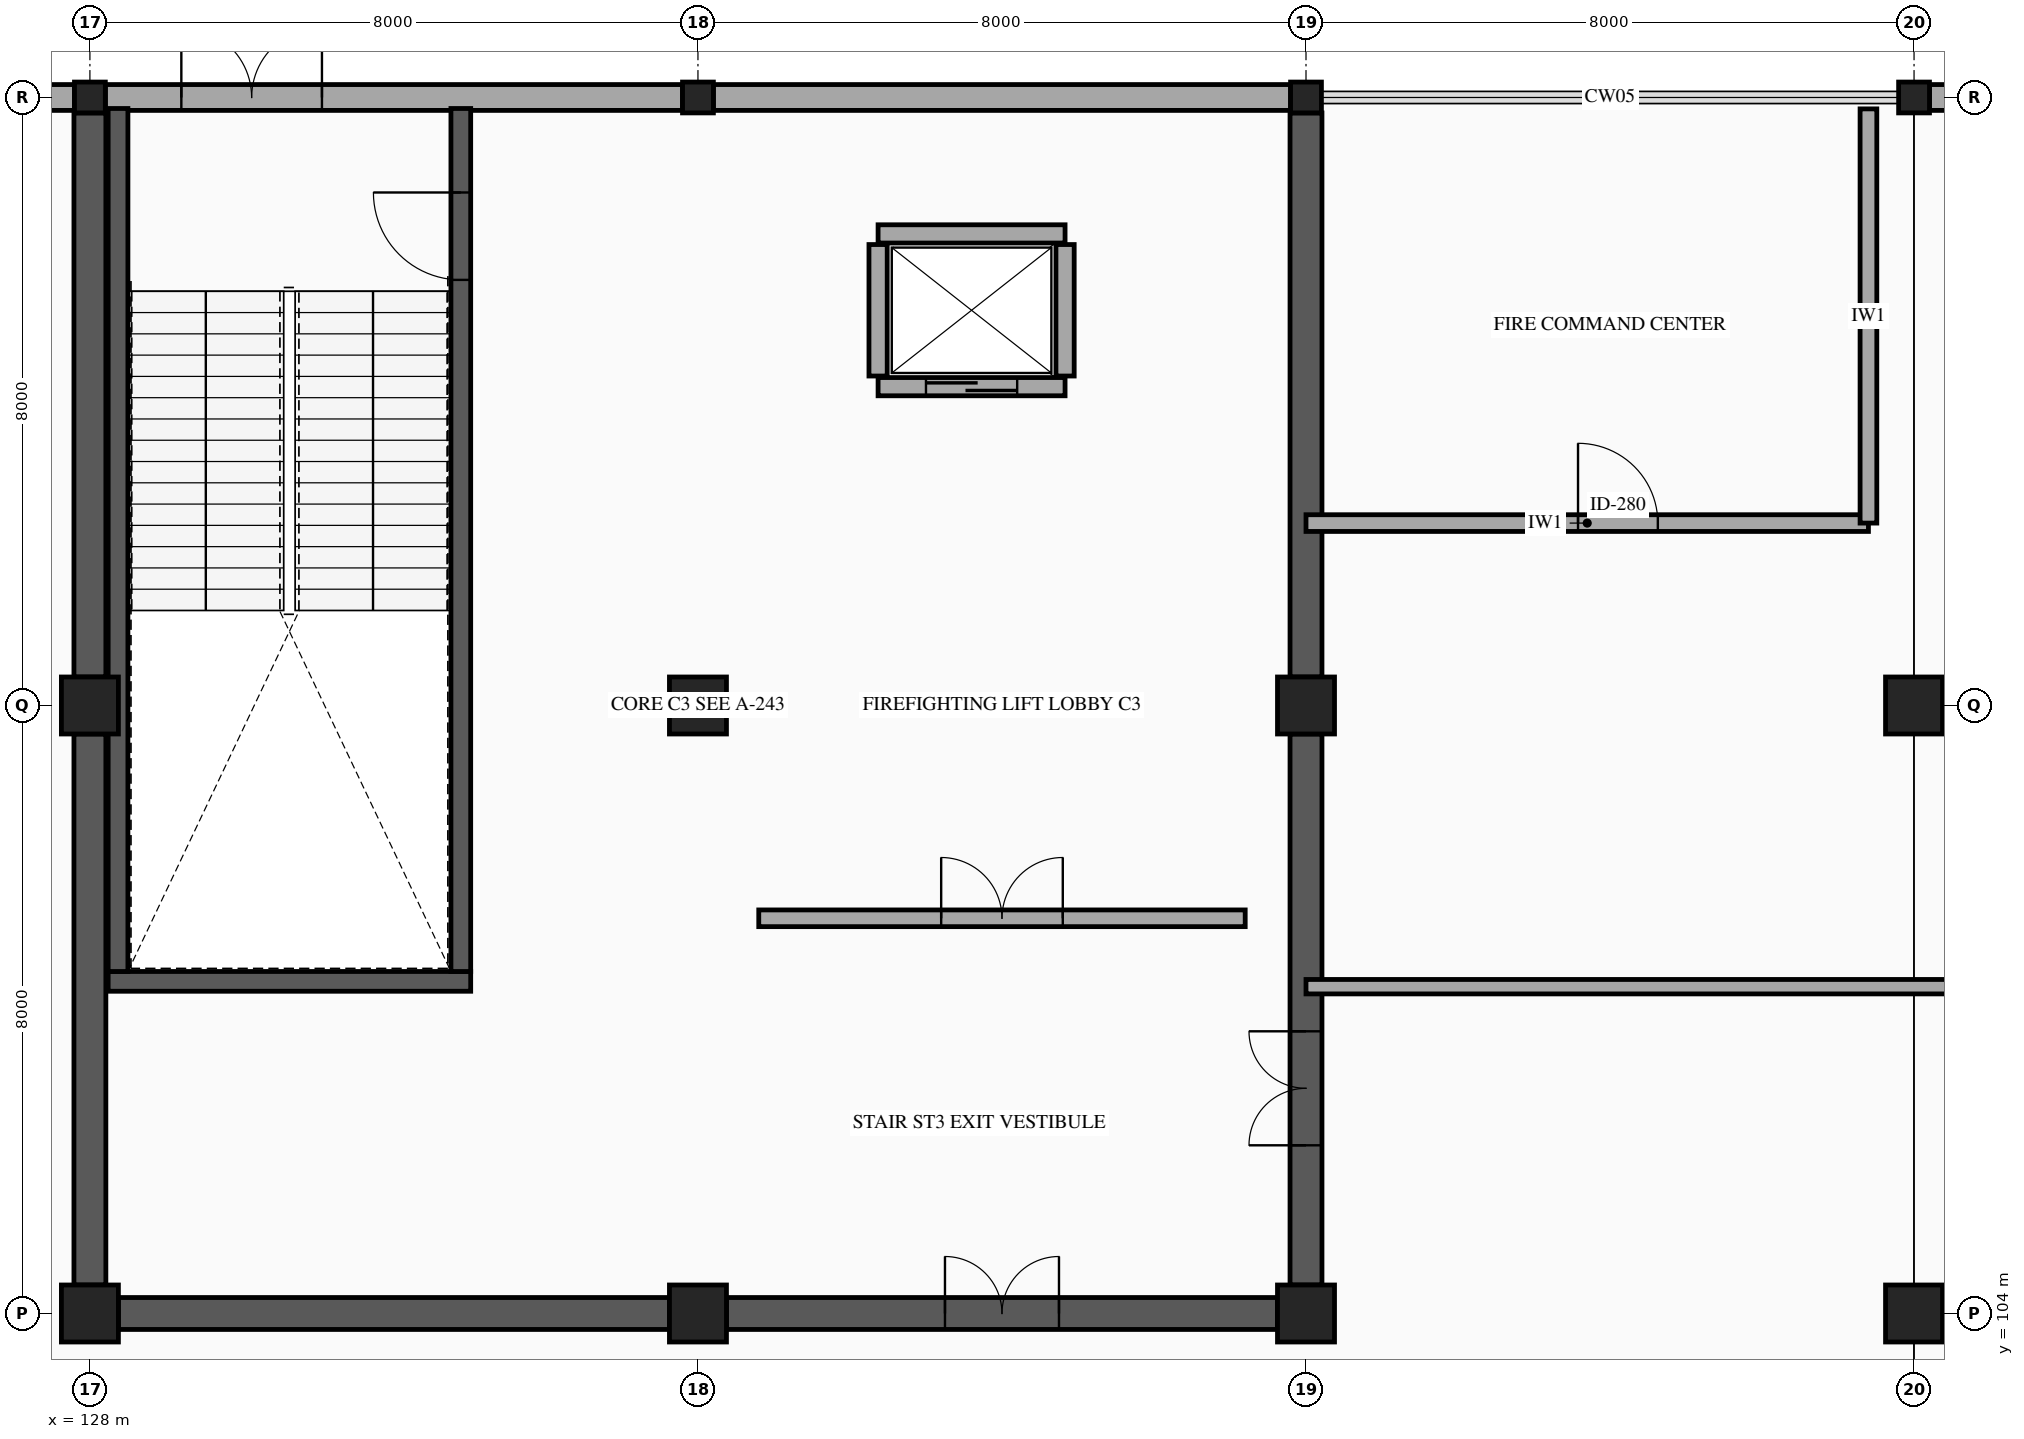
"""IFC4 building model, lengths in metres.
Left out: names, types, materials, properties, quantities, classifications, styles, units other than length and angle.
Written with IfcOpenShell. Run it as: python <this file> out.ifc"""

import sys

from ifc_helpers import new_model, si_unit, direction, frame, frame_2d, origin, origin_2d, place, context, subcontext, project, spatial, rectangle, hollow_rectangle, extrude, element, fill, save


model = new_model("IFC4")
c1 = context("Model", 3, precision=1e-05, world=origin(), true_north=direction((0.0, 1.0)))
c2 = subcontext(c1, "Body", "Model", "MODEL_VIEW")
j1 = project(units=[si_unit("LENGTHUNIT", "METRE"), si_unit("PLANEANGLEUNIT", "RADIAN")], contexts=[c1])
p1 = place(None, origin())
s1 = spatial("IfcSite", under=j1, at=p1, CompositionType="ELEMENT")
p2 = place(p1, origin())
s2 = spatial("IfcBuilding", under=s1, at=p2, CompositionType="ELEMENT")
p3 = place(p2, origin())
s3 = spatial("IfcBuildingStorey", under=s2, at=p3, CompositionType="ELEMENT", Elevation=0.0)
for number, where, z_axis, x_axis in (
    (1, (128.0, 104.0, 0.0), (0.0, 0.0, 1.0), (1.0, 0.0, 0.0)),
    (2, (128.0, 112.0, 0.0), (0.0, 0.0, 1.0), (1.0, 0.0, 0.0)),
):
    element("IfcColumn", number, at=place(p3, frame(where, z_axis=z_axis, x_axis=x_axis)), inside=s3, PredefinedType="COLUMN", context=c2, shape_type="SweptSolid", body=[
        extrude(rectangle(XDim=0.75, YDim=0.75, at=origin_2d()), origin(), (0.0, 0.0, 1.0), 5.6),
    ])
p4 = place(p3, frame((128.0, 120.0, 0.0), z_axis=(0.0, 0.0, 1.0), x_axis=(1.0, 0.0, 0.0)))
e3 = element("IfcColumn", 3, at=p4, inside=s3, PredefinedType="COLUMN", context=c2, shape_type="SweptSolid", body=[
    extrude(hollow_rectangle(XDim=0.406, YDim=0.406, WallThickness=0.015, InnerFilletRadius=0.015, OuterFilletRadius=0.029, at=origin_2d()), origin(), (0.0, 0.0, 1.0), 5.6),
])
for number, where, z_axis, x_axis in (
    (4, (136.0, 104.0, 0.0), (0.0, 0.0, 1.0), (1.0, 0.0, 0.0)),
    (5, (136.0, 112.0, 0.0), (0.0, 0.0, 1.0), (1.0, 0.0, 0.0)),
):
    element("IfcColumn", number, at=place(p3, frame(where, z_axis=z_axis, x_axis=x_axis)), inside=s3, PredefinedType="COLUMN", context=c2, shape_type="SweptSolid", body=[
        extrude(rectangle(XDim=0.75, YDim=0.75, at=origin_2d()), origin(), (0.0, 0.0, 1.0), 5.6),
    ])
p5 = place(p3, frame((136.0, 120.0, 0.0), z_axis=(0.0, 0.0, 1.0), x_axis=(1.0, 0.0, 0.0)))
e6 = element("IfcColumn", 6, at=p5, inside=s3, PredefinedType="COLUMN", context=c2, shape_type="SweptSolid", body=[
    extrude(hollow_rectangle(XDim=0.406, YDim=0.406, WallThickness=0.015, InnerFilletRadius=0.015, OuterFilletRadius=0.029, at=origin_2d()), origin(), (0.0, 0.0, 1.0), 5.6),
])
for number, where, z_axis, x_axis in (
    (7, (144.0, 104.0, 0.0), (0.0, 0.0, 1.0), (1.0, 0.0, 0.0)),
    (8, (144.0, 112.0, 0.0), (0.0, 0.0, 1.0), (1.0, 0.0, 0.0)),
):
    element("IfcColumn", number, at=place(p3, frame(where, z_axis=z_axis, x_axis=x_axis)), inside=s3, PredefinedType="COLUMN", context=c2, shape_type="SweptSolid", body=[
        extrude(rectangle(XDim=0.75, YDim=0.75, at=origin_2d()), origin(), (0.0, 0.0, 1.0), 5.6),
    ])
p6 = place(p3, frame((144.0, 120.0, 0.0), z_axis=(0.0, 0.0, 1.0), x_axis=(1.0, 0.0, 0.0)))
e9 = element("IfcColumn", 9, at=p6, inside=s3, PredefinedType="COLUMN", context=c2, shape_type="SweptSolid", body=[
    extrude(hollow_rectangle(XDim=0.406, YDim=0.406, WallThickness=0.015, InnerFilletRadius=0.015, OuterFilletRadius=0.029, at=origin_2d()), origin(), (0.0, 0.0, 1.0), 5.6),
])
for number, where, z_axis, x_axis in (
    (10, (152.0, 104.0, 0.0), (0.0, 0.0, 1.0), (1.0, 0.0, 0.0)),
    (11, (152.0, 112.0, 0.0), (0.0, 0.0, 1.0), (1.0, 0.0, 0.0)),
):
    element("IfcColumn", number, at=place(p3, frame(where, z_axis=z_axis, x_axis=x_axis)), inside=s3, PredefinedType="COLUMN", context=c2, shape_type="SweptSolid", body=[
        extrude(rectangle(XDim=0.75, YDim=0.75, at=origin_2d()), origin(), (0.0, 0.0, 1.0), 5.6),
    ])
p7 = place(p3, frame((152.0, 120.0, 0.0), z_axis=(0.0, 0.0, 1.0), x_axis=(1.0, 0.0, 0.0)))
e12 = element("IfcColumn", 12, at=p7, inside=s3, PredefinedType="COLUMN", context=c2, shape_type="SweptSolid", body=[
    extrude(hollow_rectangle(XDim=0.406, YDim=0.406, WallThickness=0.015, InnerFilletRadius=0.015, OuterFilletRadius=0.029, at=origin_2d()), origin(), (0.0, 0.0, 1.0), 5.6),
])
p8 = place(p3, frame((120.178, 120.0, 0.0), z_axis=(0.0, 0.0, 1.0), x_axis=(1.0, 0.0, 0.0)))
e13 = element("IfcWall", 13, at=p8, inside=s3, PredefinedType="STANDARD", context=c2, shape_type="SweptSolid", body=[
    extrude(rectangle(XDim=7.619, YDim=0.34, at=frame_2d((3.81, 0.0))), origin(), (0.0, 0.0, 1.0), 4.58),
])
p9 = place(p8, frame((2.809, 0.0, 0.0)))
e14 = element("IfcOpeningElement", 14, at=p9, cuts=e13, PredefinedType="OPENING", context=c2, shape_type="SweptSolid", body=[
    extrude(rectangle(XDim=2.0, YDim=2.35, at=frame_2d((1.0, 1.175))), frame((0.0, 0.18, 0.0), z_axis=(0.0, -1.0, 0.0), x_axis=(1.0, 0.0, 0.0)), (0.0, 0.0, 1.0), 0.36),
])
p10 = place(p3, frame((128.203, 120.0, 0.0), z_axis=(0.0, 0.0, 1.0), x_axis=(1.0, 0.0, 0.0)))
e15 = element("IfcWall", 15, at=p10, inside=s3, PredefinedType="STANDARD", context=c2, shape_type="SweptSolid", body=[
    extrude(rectangle(XDim=7.594, YDim=0.34, at=frame_2d((3.797, 0.0))), origin(), (0.0, 0.0, 1.0), 4.58),
])
p11 = place(p10, frame((1.0, 0.0, 0.0)))
e16 = element("IfcOpeningElement", 16, at=p11, cuts=e15, PredefinedType="OPENING", context=c2, shape_type="SweptSolid", body=[
    extrude(rectangle(XDim=1.85, YDim=2.2, at=frame_2d((0.925, 1.1))), frame((0.0, 0.18, 0.0), z_axis=(0.0, -1.0, 0.0), x_axis=(1.0, 0.0, 0.0)), (0.0, 0.0, 1.0), 0.36),
])
p12 = place(p3, frame((136.203, 120.0, 0.0), z_axis=(0.0, 0.0, 1.0), x_axis=(1.0, 0.0, 0.0)))
e17 = element("IfcWall", 17, at=p12, inside=s3, PredefinedType="STANDARD", context=c2, shape_type="SweptSolid", body=[
    extrude(rectangle(XDim=7.594, YDim=0.34, at=frame_2d((3.797, 0.0))), origin(), (0.0, 0.0, 1.0), 4.58),
])
p13 = place(p3, frame((152.203, 120.0, 0.0), z_axis=(0.0, 0.0, 1.0), x_axis=(1.0, 0.0, 0.0)))
e18 = element("IfcWall", 18, at=p13, inside=s3, PredefinedType="STANDARD", context=c2, shape_type="SweptSolid", body=[
    extrude(rectangle(XDim=7.594, YDim=0.34, at=frame_2d((3.797, 0.0))), origin(), (0.0, 0.0, 1.0), 4.58),
])
p14 = place(p13, frame((2.697, 0.0, 0.0)))
e19 = element("IfcOpeningElement", 19, at=p14, cuts=e18, PredefinedType="OPENING", context=c2, shape_type="SweptSolid", body=[
    extrude(rectangle(XDim=2.2, YDim=2.45, at=frame_2d((1.1, 1.225))), frame((0.0, 0.18, 0.0), z_axis=(0.0, -1.0, 0.0), x_axis=(1.0, 0.0, 0.0)), (0.0, 0.0, 1.0), 0.36),
])
p15 = place(p3, frame((128.24, 108.37, 0.0), z_axis=(0.0, 0.0, 1.0), x_axis=(1.0, 0.0, 0.0)))
e20 = element("IfcWall", 20, at=p15, inside=s3, PredefinedType="SHEAR", context=c2, shape_type="SweptSolid", body=[
    extrude(rectangle(XDim=4.77, YDim=0.26, at=frame_2d((2.385, 0.0))), origin(), (0.0, 0.0, 1.0), 5.38),
])
p16 = place(p3, frame((128.37, 108.5, 0.0), z_axis=(0.0, 0.0, 1.0), x_axis=(0.0, 1.0, 0.0)))
e21 = element("IfcWall", 21, at=p16, inside=s3, PredefinedType="SHEAR", context=c2, shape_type="SweptSolid", body=[
    extrude(rectangle(XDim=11.355, YDim=0.26, at=frame_2d((5.677, 0.0))), origin(), (0.0, 0.0, 1.0), 5.38),
])
p17 = place(p3, frame((132.88, 108.5, 0.0), z_axis=(0.0, 0.0, 1.0), x_axis=(0.0, 1.0, 0.0)))
e22 = element("IfcWall", 22, at=p17, inside=s3, PredefinedType="SHEAR", context=c2, shape_type="SweptSolid", body=[
    extrude(rectangle(XDim=11.355, YDim=0.26, at=frame_2d((5.677, 0.0))), origin(), (0.0, 0.0, 1.0), 5.38),
])
p18 = place(p17, frame((9.1, 0.0, 0.0)))
e23 = element("IfcOpeningElement", 23, at=p18, cuts=e22, PredefinedType="OPENING", context=c2, shape_type="SweptSolid", body=[
    extrude(rectangle(XDim=1.15, YDim=2.15, at=frame_2d((0.575, 1.075))), frame((0.0, 0.14, 0.0), z_axis=(0.0, -1.0, 0.0), x_axis=(1.0, 0.0, 0.0)), (0.0, 0.0, 1.0), 0.28),
])
p19 = place(p3, frame((128.375, 104.0, 0.0), z_axis=(0.0, 0.0, 1.0), x_axis=(1.0, 0.0, 0.0)))
e24 = element("IfcWall", 24, at=p19, inside=s3, PredefinedType="SHEAR", context=c2, shape_type="SweptSolid", body=[
    extrude(rectangle(XDim=7.25, YDim=0.42, at=frame_2d((3.625, 0.0))), origin(), (0.0, 0.0, 1.0), 5.38),
])
p20 = place(p3, frame((136.375, 104.0, 0.0), z_axis=(0.0, 0.0, 1.0), x_axis=(1.0, 0.0, 0.0)))
e25 = element("IfcWall", 25, at=p20, inside=s3, PredefinedType="SHEAR", context=c2, shape_type="SweptSolid", body=[
    extrude(rectangle(XDim=7.25, YDim=0.42, at=frame_2d((3.625, 0.0))), origin(), (0.0, 0.0, 1.0), 5.38),
])
p21 = place(p20, frame((2.875, 0.0, 0.0)))
e26 = element("IfcOpeningElement", 26, at=p21, cuts=e25, PredefinedType="OPENING", context=c2, shape_type="SweptSolid", body=[
    extrude(rectangle(XDim=1.5, YDim=2.15, at=frame_2d((0.75, 1.075))), frame((0.0, 0.22, 0.0), z_axis=(0.0, -1.0, 0.0), x_axis=(1.0, 0.0, 0.0)), (0.0, 0.0, 1.0), 0.44),
])
p22 = place(p3, frame((128.0, 104.375, 0.0), z_axis=(0.0, 0.0, 1.0), x_axis=(0.0, 1.0, 0.0)))
e27 = element("IfcWall", 27, at=p22, inside=s3, PredefinedType="SHEAR", context=c2, shape_type="SweptSolid", body=[
    extrude(rectangle(XDim=7.25, YDim=0.42, at=frame_2d((3.625, 0.0))), origin(), (0.0, 0.0, 1.0), 5.38),
])
p23 = place(p3, frame((128.0, 112.375, 0.0), z_axis=(0.0, 0.0, 1.0), x_axis=(0.0, 1.0, 0.0)))
e28 = element("IfcWall", 28, at=p23, inside=s3, PredefinedType="SHEAR", context=c2, shape_type="SweptSolid", body=[
    extrude(rectangle(XDim=7.422, YDim=0.42, at=frame_2d((3.711, 0.0))), origin(), (0.0, 0.0, 1.0), 5.38),
])
p24 = place(p3, frame((144.0, 104.375, 0.0), z_axis=(0.0, 0.0, 1.0), x_axis=(0.0, 1.0, 0.0)))
e29 = element("IfcWall", 29, at=p24, inside=s3, PredefinedType="SHEAR", context=c2, shape_type="SweptSolid", body=[
    extrude(rectangle(XDim=7.25, YDim=0.42, at=frame_2d((3.625, 0.0))), origin(), (0.0, 0.0, 1.0), 5.38),
])
p25 = place(p24, frame((1.838, 0.0, 0.0)))
e30 = element("IfcOpeningElement", 30, at=p25, cuts=e29, PredefinedType="OPENING", context=c2, shape_type="SweptSolid", body=[
    extrude(rectangle(XDim=1.5, YDim=2.15, at=frame_2d((0.75, 1.075))), frame((0.0, 0.22, 0.0), z_axis=(0.0, -1.0, 0.0), x_axis=(1.0, 0.0, 0.0)), (0.0, 0.0, 1.0), 0.44),
])
p26 = place(p3, frame((144.0, 112.375, 0.0), z_axis=(0.0, 0.0, 1.0), x_axis=(0.0, 1.0, 0.0)))
e31 = element("IfcWall", 31, at=p26, inside=s3, PredefinedType="SHEAR", context=c2, shape_type="SweptSolid", body=[
    extrude(rectangle(XDim=7.422, YDim=0.42, at=frame_2d((3.711, 0.0))), origin(), (0.0, 0.0, 1.0), 5.38),
])
p27 = place(p3, frame((138.37, 116.195, 0.0), z_axis=(0.0, 0.0, 1.0), x_axis=(1.0, 0.0, 0.0)))
e32 = element("IfcWall", 32, at=p27, inside=s3, PredefinedType="PARTITIONING", context=c2, shape_type="SweptSolid", body=[
    extrude(rectangle(XDim=2.46, YDim=0.24, at=frame_2d((1.23, 0.0))), origin(), (0.0, 0.0, 1.0), 5.38),
])
p28 = place(p27, frame((0.63, 0.0, 0.0)))
e33 = element("IfcOpeningElement", 33, at=p28, cuts=e32, PredefinedType="OPENING", context=c2, shape_type="SweptSolid", body=[
    extrude(rectangle(XDim=1.2, YDim=2.15, at=frame_2d((0.6, 1.075))), frame((0.0, 0.13, 0.0), z_axis=(0.0, -1.0, 0.0), x_axis=(1.0, 0.0, 0.0)), (0.0, 0.0, 1.0), 0.26),
])
p29 = place(p3, frame((138.37, 118.205, 0.0), z_axis=(0.0, 0.0, 1.0), x_axis=(1.0, 0.0, 0.0)))
e34 = element("IfcWall", 34, at=p29, inside=s3, PredefinedType="PARTITIONING", context=c2, shape_type="SweptSolid", body=[
    extrude(rectangle(XDim=2.46, YDim=0.24, at=frame_2d((1.23, 0.0))), origin(), (0.0, 0.0, 1.0), 5.38),
])
for number, where, z_axis, x_axis in (
    (35, (138.37, 116.335, 0.0), (0.0, 0.0, 1.0), (0.0, 1.0, 0.0)),
    (36, (140.83, 116.335, 0.0), (0.0, 0.0, 1.0), (0.0, 1.0, 0.0)),
):
    element("IfcWall", number, at=place(p3, frame(where, z_axis=z_axis, x_axis=x_axis)), inside=s3, PredefinedType="PARTITIONING", context=c2, shape_type="SweptSolid", body=[
        extrude(rectangle(XDim=1.73, YDim=0.24, at=frame_2d((0.865, 0.0))), origin(), (0.0, 0.0, 1.0), 5.38),
    ])
p30 = place(p3, frame((136.8, 109.2, 0.0), z_axis=(0.0, 0.0, 1.0), x_axis=(1.0, 0.0, 0.0)))
e37 = element("IfcWall", 37, at=p30, inside=s3, PredefinedType="PARTITIONING", context=c2, shape_type="SweptSolid", body=[
    extrude(rectangle(XDim=6.4, YDim=0.22, at=frame_2d((3.2, 0.0))), origin(), (0.0, 0.0, 1.0), 4.58),
])
p31 = place(p30, frame((2.4, 0.0, 0.0)))
e38 = element("IfcOpeningElement", 38, at=p31, cuts=e37, PredefinedType="OPENING", context=c2, shape_type="SweptSolid", body=[
    extrude(rectangle(XDim=1.6, YDim=2.15, at=frame_2d((0.8, 1.075))), frame((0.0, 0.12, 0.0), z_axis=(0.0, -1.0, 0.0), x_axis=(1.0, 0.0, 0.0)), (0.0, 0.0, 1.0), 0.24),
])
p32 = place(p3, frame((144.0, 114.4, 0.0), z_axis=(0.0, 0.0, 1.0), x_axis=(1.0, 0.0, 0.0)))
e39 = element("IfcWall", 39, at=p32, inside=s3, PredefinedType="PARTITIONING", context=c2, shape_type="SweptSolid", body=[
    extrude(rectangle(XDim=7.4, YDim=0.22, at=frame_2d((3.7, 0.0))), origin(), (0.0, 0.0, 1.0), 4.58),
])
p33 = place(p32, frame((3.579, 0.0, 0.0)))
e40 = element("IfcOpeningElement", 40, at=p33, cuts=e39, PredefinedType="OPENING", context=c2, shape_type="SweptSolid", body=[
    extrude(rectangle(XDim=1.05, YDim=2.15, at=frame_2d((0.525, 1.075))), frame((0.0, 0.12, 0.0), z_axis=(0.0, -1.0, 0.0), x_axis=(1.0, 0.0, 0.0)), (0.0, 0.0, 1.0), 0.24),
])
p34 = place(p3, frame((151.4, 114.4, 0.0), z_axis=(0.0, 0.0, 1.0), x_axis=(0.0, 1.0, 0.0)))
e41 = element("IfcWall", 41, at=p34, inside=s3, PredefinedType="PARTITIONING", context=c2, shape_type="SweptSolid", body=[
    extrude(rectangle(XDim=5.45, YDim=0.22, at=frame_2d((2.725, 0.0))), origin(), (0.0, 0.0, 1.0), 4.58),
])
p35 = place(p3, frame((144.0, 108.3, 0.0), z_axis=(0.0, 0.0, 1.0), x_axis=(1.0, 0.0, 0.0)))
e42 = element("IfcWall", 42, at=p35, inside=s3, PredefinedType="PARTITIONING", context=c2, shape_type="SweptSolid", body=[
    extrude(rectangle(XDim=31.85, YDim=0.19, at=frame_2d((15.925, 0.0))), origin(), (0.0, 0.0, 1.0), 4.58),
])
p36 = place(p35, frame((27.091, 0.0, 0.0)))
e43 = element("IfcOpeningElement", 43, at=p36, cuts=e42, PredefinedType="OPENING", context=c2, shape_type="SweptSolid", body=[
    extrude(rectangle(XDim=1.8, YDim=2.25, at=frame_2d((0.9, 1.125))), frame((0.0, 0.105, 0.0), z_axis=(0.0, -1.0, 0.0), x_axis=(1.0, 0.0, 0.0)), (0.0, 0.0, 1.0), 0.21),
])
p37 = place(p11, origin())
e44 = element("IfcDoor", 44, at=p37, inside=s3, OperationType="DOUBLE_DOOR_SINGLE_SWING", PredefinedType="DOOR", context=c2, shape_type="SweptSolid", body=[
    extrude(rectangle(XDim=1.85, YDim=2.2, at=frame_2d((0.925, 1.1))), frame((0.0, 0.025, 0.0), z_axis=(0.0, -1.0, 0.0), x_axis=(1.0, 0.0, 0.0)), (0.0, 0.0, 1.0), 0.05),
])
fill(e16, e44)
p38 = place(p18, origin())
e45 = element("IfcDoor", 45, at=p38, inside=s3, OperationType="SINGLE_SWING_RIGHT", PredefinedType="DOOR", context=c2, shape_type="SweptSolid", body=[
    extrude(rectangle(XDim=1.15, YDim=2.15, at=frame_2d((0.575, 1.075))), frame((0.0, 0.025, 0.0), z_axis=(0.0, -1.0, 0.0), x_axis=(1.0, 0.0, 0.0)), (0.0, 0.0, 1.0), 0.05),
])
fill(e23, e45)
p39 = place(p21, origin())
e46 = element("IfcDoor", 46, at=p39, inside=s3, OperationType="DOUBLE_DOOR_SINGLE_SWING", PredefinedType="DOOR", context=c2, shape_type="SweptSolid", body=[
    extrude(rectangle(XDim=1.5, YDim=2.15, at=frame_2d((0.75, 1.075))), frame((0.0, 0.025, 0.0), z_axis=(0.0, -1.0, 0.0), x_axis=(1.0, 0.0, 0.0)), (0.0, 0.0, 1.0), 0.05),
])
fill(e26, e46)
p40 = place(p25, origin())
e47 = element("IfcDoor", 47, at=p40, inside=s3, OperationType="DOUBLE_DOOR_SINGLE_SWING", PredefinedType="DOOR", context=c2, shape_type="SweptSolid", body=[
    extrude(rectangle(XDim=1.5, YDim=2.15, at=frame_2d((0.75, 1.075))), frame((0.0, 0.025, 0.0), z_axis=(0.0, -1.0, 0.0), x_axis=(1.0, 0.0, 0.0)), (0.0, 0.0, 1.0), 0.05),
])
fill(e30, e47)
p41 = place(p28, origin())
e48 = element("IfcDoor", 48, at=p41, inside=s3, OperationType="SLIDING_TO_LEFT", PredefinedType="DOOR", context=c2, shape_type="SweptSolid", body=[
    extrude(rectangle(XDim=1.2, YDim=2.15, at=frame_2d((0.6, 1.075))), frame((0.0, 0.025, 0.0), z_axis=(0.0, -1.0, 0.0), x_axis=(1.0, 0.0, 0.0)), (0.0, 0.0, 1.0), 0.05),
])
fill(e33, e48)
p42 = place(p31, origin())
e49 = element("IfcDoor", 49, at=p42, inside=s3, OperationType="DOUBLE_DOOR_SINGLE_SWING", PredefinedType="DOOR", context=c2, shape_type="SweptSolid", body=[
    extrude(rectangle(XDim=1.6, YDim=2.15, at=frame_2d((0.8, 1.075))), frame((0.0, 0.025, 0.0), z_axis=(0.0, -1.0, 0.0), x_axis=(1.0, 0.0, 0.0)), (0.0, 0.0, 1.0), 0.05),
])
fill(e38, e49)
p43 = place(p33, origin())
e50 = element("IfcDoor", 50, at=p43, inside=s3, OperationType="SINGLE_SWING_LEFT", PredefinedType="DOOR", context=c2, shape_type="SweptSolid", body=[
    extrude(rectangle(XDim=1.05, YDim=2.15, at=frame_2d((0.525, 1.075))), frame((0.0, 0.025, 0.0), z_axis=(0.0, -1.0, 0.0), x_axis=(1.0, 0.0, 0.0)), (0.0, 0.0, 1.0), 0.05),
])
fill(e40, e50)
save(model, sys.argv[1])
